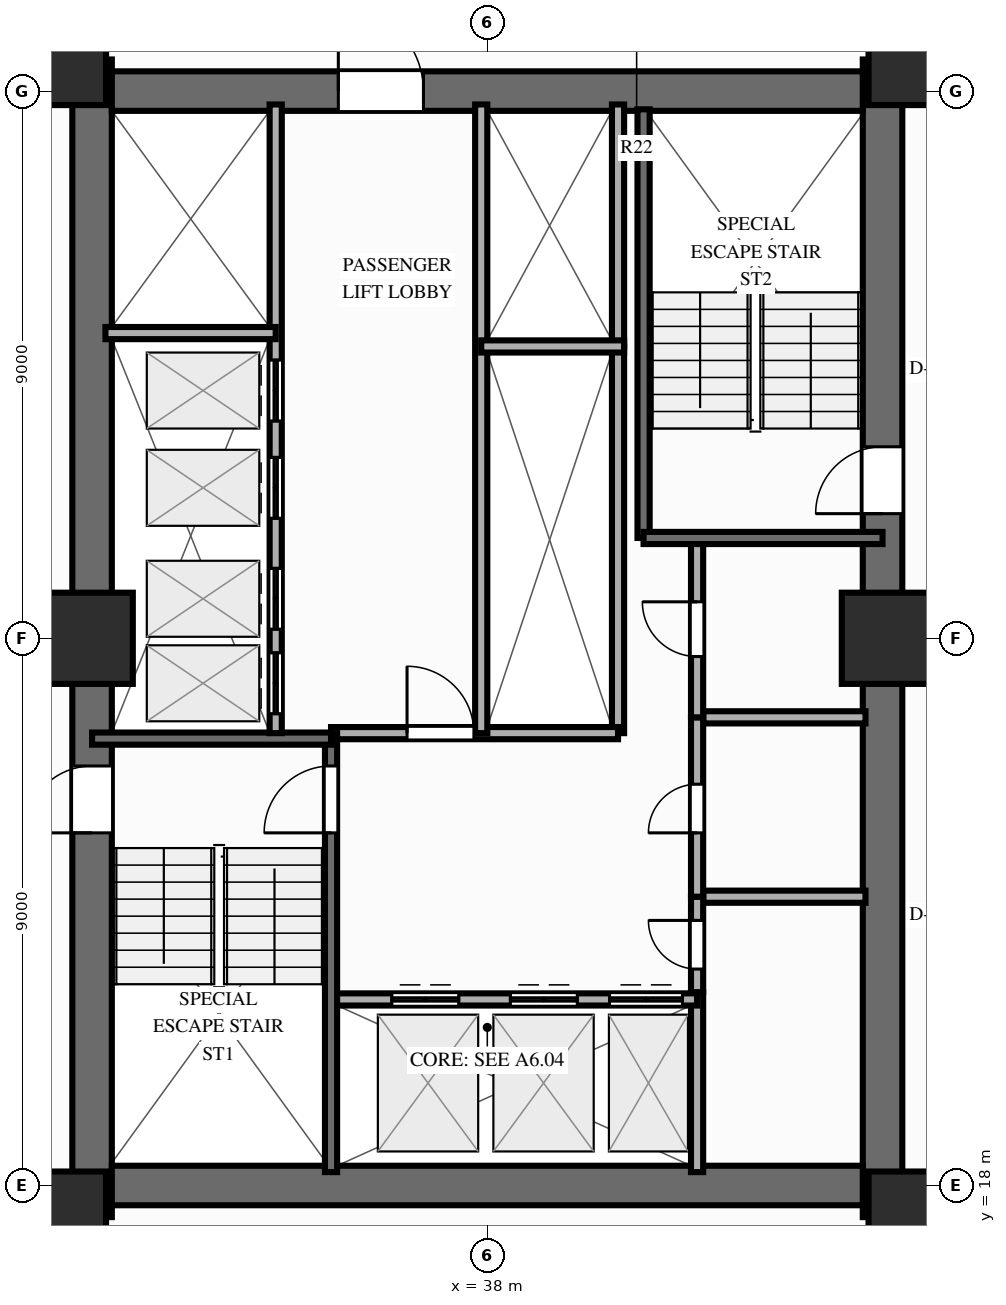
"""IFC4 building model, lengths in metres.
Left out: names, types, materials, properties, quantities, classifications, styles, units other than length and angle.
Written with IfcOpenShell. Run it as: python <this file> out.ifc"""

import sys

from ifc_helpers import new_model, si_unit, direction, frame, frame_2d, origin, origin_2d, place, context, subcontext, project, spatial, rectangle, extrude, source, transform, mapped, element, fill, save


model = new_model("IFC4")
c1 = context("Model", 3, precision=1e-05, world=origin(), true_north=direction((0.0, 1.0)))
c2 = subcontext(c1, "Body", "Model", "MODEL_VIEW")
j1 = project(units=[si_unit("LENGTHUNIT", "METRE"), si_unit("PLANEANGLEUNIT", "RADIAN")], contexts=[c1])
p1 = place(None, origin())
s1 = spatial("IfcSite", under=j1, at=p1, CompositionType="ELEMENT")
p2 = place(p1, origin())
s2 = spatial("IfcBuilding", under=s1, at=p2, CompositionType="ELEMENT")
p3 = place(p2, frame((0.0, 0.0, 34.4)))
s3 = spatial("IfcBuildingStorey", under=s2, at=p3, CompositionType="ELEMENT", Elevation=34.4)
p4 = place(p3, frame((31.5, 17.48, 0.0), z_axis=(0.0, 0.0, 1.0), x_axis=(0.0, 1.0, 0.0)))
e1 = element("IfcWall", 1, at=p4, inside=s3, PredefinedType="SHEAR", context=c2, shape_type="SweptSolid", body=[
    extrude(rectangle(XDim=19.04, YDim=0.65, at=frame_2d((9.52, 0.0))), origin(), (0.0, 0.0, 1.0), 3.0),
])
p5 = place(p4, frame((6.32, 0.0, 0.0)))
e2 = element("IfcOpeningElement", 2, at=p5, cuts=e1, PredefinedType="OPENING", context=c2, shape_type="SweptSolid", body=[
    extrude(rectangle(XDim=1.1, YDim=2.15, at=frame_2d((0.55, 1.075))), frame((0.0, 0.337, 0.0), z_axis=(0.0, -1.0, 0.0), x_axis=(1.0, 0.0, 0.0)), (0.0, 0.0, 1.0), 0.674),
])
p6 = place(p3, frame((44.5, 17.48, 0.0), z_axis=(0.0, 0.0, 1.0), x_axis=(0.0, 1.0, 0.0)))
e3 = element("IfcWall", 3, at=p6, inside=s3, PredefinedType="SHEAR", context=c2, shape_type="SweptSolid", body=[
    extrude(rectangle(XDim=19.04, YDim=0.65, at=frame_2d((9.52, 0.0))), origin(), (0.0, 0.0, 1.0), 3.0),
])
p7 = place(p6, frame((12.67, 0.0, 0.0), z_axis=(0.0, 0.0, 1.0), x_axis=(-1.0, 0.0, 0.0)))
e4 = element("IfcOpeningElement", 4, at=p7, cuts=e3, PredefinedType="OPENING", context=c2, shape_type="SweptSolid", body=[
    extrude(rectangle(XDim=1.1, YDim=2.15, at=frame_2d((0.55, 1.075))), frame((0.0, 0.337, 0.0), z_axis=(0.0, -1.0, 0.0), x_axis=(1.0, 0.0, 0.0)), (0.0, 0.0, 1.0), 0.674),
])
p8 = place(p3, frame((31.825, 18.0, 0.0), z_axis=(0.0, 0.0, 1.0), x_axis=(1.0, 0.0, 0.0)))
e5 = element("IfcWall", 5, at=p8, inside=s3, PredefinedType="SHEAR", context=c2, shape_type="SweptSolid", body=[
    extrude(rectangle(XDim=12.35, YDim=0.65, at=frame_2d((6.175, 0.0))), origin(), (0.0, 0.0, 1.0), 3.0),
])
p9 = place(p3, frame((31.825, 36.0, 0.0), z_axis=(0.0, 0.0, 1.0), x_axis=(1.0, 0.0, 0.0)))
e6 = element("IfcWall", 6, at=p9, inside=s3, PredefinedType="SHEAR", context=c2, shape_type="SweptSolid", body=[
    extrude(rectangle(XDim=12.35, YDim=0.65, at=frame_2d((6.175, 0.0))), origin(), (0.0, 0.0, 1.0), 3.0),
])
p10 = place(p9, frame((5.125, 0.0, 0.0), z_axis=(0.0, 0.0, 1.0), x_axis=(-1.0, 0.0, 0.0)))
e7 = element("IfcOpeningElement", 7, at=p10, cuts=e6, PredefinedType="OPENING", context=c2, shape_type="SweptSolid", body=[
    extrude(rectangle(XDim=1.4, YDim=2.15, at=frame_2d((0.7, 1.075))), frame((0.0, 0.337, 0.0), z_axis=(0.0, -1.0, 0.0), x_axis=(1.0, 0.0, 0.0)), (0.0, 0.0, 1.0), 0.674),
])
m1 = source(origin(), c2, "Body", "SweptSolid", [
    extrude(rectangle(XDim=1.5, YDim=1.5, at=origin_2d()), origin(), (0.0, 0.0, 1.0), 3.0),
])
for number, where, z_axis, x_axis in (
    (8, (30.98, 17.48, 0.0), (0.0, 0.0, 1.0), (1.0, 0.0, 0.0)),
    (9, (45.02, 17.48, 0.0), (0.0, 0.0, 1.0), (1.0, 0.0, 0.0)),
    (10, (30.98, 36.52, 0.0), (0.0, 0.0, 1.0), (1.0, 0.0, 0.0)),
    (11, (45.02, 36.52, 0.0), (0.0, 0.0, 1.0), (1.0, 0.0, 0.0)),
    (12, (31.42, 27.0, 0.0), (0.0, 0.0, 1.0), (1.0, 0.0, 0.0)),
    (13, (44.58, 27.0, 0.0), (0.0, 0.0, 1.0), (1.0, 0.0, 0.0)),
):
    element("IfcColumn", number, at=place(p3, frame(where, z_axis=z_axis, x_axis=x_axis)), inside=s3, PredefinedType="COLUMN", context=c2, shape_type="MappedRepresentation", body=[
        mapped(m1, transform((0.0, 0.0, 0.0), scale=1.0)),
    ])
p11 = place(p3, frame((41.55, 22.75, 0.0), z_axis=(0.0, 0.0, 1.0), x_axis=(1.0, 0.0, 0.0)))
e14 = element("IfcWall", 14, at=p11, inside=s3, PredefinedType="PARTITIONING", context=c2, shape_type="SweptSolid", body=[
    extrude(rectangle(XDim=2.67, YDim=0.2, at=frame_2d((1.335, 0.0))), origin(), (0.0, 0.0, 1.0), 2.79),
])
p12 = place(p3, frame((41.55, 25.7, 0.0), z_axis=(0.0, 0.0, 1.0), x_axis=(1.0, 0.0, 0.0)))
e15 = element("IfcWall", 15, at=p12, inside=s3, PredefinedType="PARTITIONING", context=c2, shape_type="SweptSolid", body=[
    extrude(rectangle(XDim=2.67, YDim=0.2, at=frame_2d((1.335, 0.0))), origin(), (0.0, 0.0, 1.0), 2.14),
])
p13 = place(p3, frame((41.45, 18.22, 0.0), z_axis=(0.0, 0.0, 1.0), x_axis=(0.0, 1.0, 0.0)))
e16 = element("IfcWall", 16, at=p13, inside=s3, PredefinedType="PARTITIONING", context=c2, shape_type="SweptSolid", body=[
    extrude(rectangle(XDim=2.96, YDim=0.2, at=frame_2d((1.48, 0.0))), origin(), (0.0, 0.0, 1.0), 2.79),
])
p14 = place(p3, frame((41.45, 21.18, 0.0), z_axis=(0.0, 0.0, 1.0), x_axis=(0.0, 1.0, 0.0)))
e17 = element("IfcWall", 17, at=p14, inside=s3, PredefinedType="PARTITIONING", context=c2, shape_type="SweptSolid", body=[
    extrude(rectangle(XDim=1.57, YDim=0.2, at=frame_2d((0.785, 0.0))), origin(), (0.0, 0.0, 1.0), 2.79),
])
p15 = place(p14, frame((0.38, 0.0, 0.0)))
e18 = element("IfcOpeningElement", 18, at=p15, cuts=e17, PredefinedType="OPENING", context=c2, shape_type="SweptSolid", body=[
    extrude(rectangle(XDim=0.8, YDim=2.05, at=frame_2d((0.4, 1.025))), frame((0.0, 0.112, 0.0), z_axis=(0.0, -1.0, 0.0), x_axis=(1.0, 0.0, 0.0)), (0.0, 0.0, 1.0), 0.224),
])
p16 = place(p3, frame((41.45, 22.75, 0.0), z_axis=(0.0, 0.0, 1.0), x_axis=(0.0, 1.0, 0.0)))
e19 = element("IfcWall", 19, at=p16, inside=s3, PredefinedType="PARTITIONING", context=c2, shape_type="SweptSolid", body=[
    extrude(rectangle(XDim=2.95, YDim=0.2, at=frame_2d((1.475, 0.0))), origin(), (0.0, 0.0, 1.0), 2.79),
])
p17 = place(p16, frame((1.05, 0.0, 0.0)))
e20 = element("IfcOpeningElement", 20, at=p17, cuts=e19, PredefinedType="OPENING", context=c2, shape_type="SweptSolid", body=[
    extrude(rectangle(XDim=0.8, YDim=2.05, at=frame_2d((0.4, 1.025))), frame((0.0, 0.112, 0.0), z_axis=(0.0, -1.0, 0.0), x_axis=(1.0, 0.0, 0.0)), (0.0, 0.0, 1.0), 0.224),
])
p18 = place(p3, frame((41.45, 25.7, 0.0), z_axis=(0.0, 0.0, 1.0), x_axis=(0.0, 1.0, 0.0)))
e21 = element("IfcWall", 21, at=p18, inside=s3, PredefinedType="PARTITIONING", context=c2, shape_type="SweptSolid", body=[
    extrude(rectangle(XDim=2.9, YDim=0.2, at=frame_2d((1.45, 0.0))), origin(), (0.0, 0.0, 1.0), 2.79),
])
p19 = place(p18, frame((1.0, 0.0, 0.0)))
e22 = element("IfcOpeningElement", 22, at=p19, cuts=e21, PredefinedType="OPENING", context=c2, shape_type="SweptSolid", body=[
    extrude(rectangle(XDim=0.9, YDim=2.1, at=frame_2d((0.45, 1.05))), frame((0.0, 0.112, 0.0), z_axis=(0.0, -1.0, 0.0), x_axis=(1.0, 0.0, 0.0)), (0.0, 0.0, 1.0), 0.224),
])
p20 = place(p3, frame((40.15, 25.44, 0.0), z_axis=(0.0, 0.0, 1.0), x_axis=(0.0, 1.0, 0.0)))
e23 = element("IfcWall", 23, at=p20, inside=s3, PredefinedType="PARTITIONING", context=c2, shape_type="SweptSolid", body=[
    extrude(rectangle(XDim=6.36, YDim=0.2, at=frame_2d((3.18, 0.0))), origin(), (0.0, 0.0, 1.0), 2.79),
])
p21 = place(p3, frame((40.15, 31.8, 0.0), z_axis=(0.0, 0.0, 1.0), x_axis=(0.0, 1.0, 0.0)))
e24 = element("IfcWall", 24, at=p21, inside=s3, PredefinedType="PARTITIONING", context=c2, shape_type="SweptSolid", body=[
    extrude(rectangle(XDim=3.98, YDim=0.2, at=frame_2d((1.99, 0.0))), origin(), (0.0, 0.0, 1.0), 2.79),
])
p22 = place(p3, frame((35.43, 21.06, 0.0), z_axis=(0.0, 0.0, 1.0), x_axis=(1.0, 0.0, 0.0)))
e25 = element("IfcWall", 25, at=p22, inside=s3, PredefinedType="PARTITIONING", context=c2, shape_type="SweptSolid", body=[
    extrude(rectangle(XDim=6.02, YDim=0.2, at=frame_2d((3.01, 0.0))), origin(), (0.0, 0.0, 1.0), 2.79),
])
p23 = place(p22, frame((1.0, 0.0, 0.0)))
e26 = element("IfcOpeningElement", 26, at=p23, cuts=e25, PredefinedType="OPENING", context=c2, shape_type="SweptSolid", body=[
    extrude(rectangle(XDim=1.1, YDim=2.15, at=frame_2d((0.55, 1.075))), frame((0.0, 0.112, 0.0), z_axis=(0.0, -1.0, 0.0), x_axis=(1.0, 0.0, 0.0)), (0.0, 0.0, 1.0), 0.224),
])
p24 = place(p22, frame((2.95, 0.0, 0.0)))
e27 = element("IfcOpeningElement", 27, at=p24, cuts=e25, PredefinedType="OPENING", context=c2, shape_type="SweptSolid", body=[
    extrude(rectangle(XDim=1.1, YDim=2.15, at=frame_2d((0.55, 1.075))), frame((0.0, 0.112, 0.0), z_axis=(0.0, -1.0, 0.0), x_axis=(1.0, 0.0, 0.0)), (0.0, 0.0, 1.0), 0.224),
])
p25 = place(p22, frame((4.58, 0.0, 0.0)))
e28 = element("IfcOpeningElement", 28, at=p25, cuts=e25, PredefinedType="OPENING", context=c2, shape_type="SweptSolid", body=[
    extrude(rectangle(XDim=1.2, YDim=2.15, at=frame_2d((0.6, 1.075))), frame((0.0, 0.112, 0.0), z_axis=(0.0, -1.0, 0.0), x_axis=(1.0, 0.0, 0.0)), (0.0, 0.0, 1.0), 0.224),
])
p26 = place(p3, frame((35.43, 25.44, 0.0), z_axis=(0.0, 0.0, 1.0), x_axis=(1.0, 0.0, 0.0)))
e29 = element("IfcWall", 29, at=p26, inside=s3, PredefinedType="PARTITIONING", context=c2, shape_type="SweptSolid", body=[
    extrude(rectangle(XDim=4.72, YDim=0.2, at=frame_2d((2.36, 0.0))), origin(), (0.0, 0.0, 1.0), 2.79),
])
p27 = place(p26, frame((1.25, 0.0, 0.0)))
e30 = element("IfcOpeningElement", 30, at=p27, cuts=e29, PredefinedType="OPENING", context=c2, shape_type="SweptSolid", body=[
    extrude(rectangle(XDim=1.1, YDim=2.15, at=frame_2d((0.55, 1.075))), frame((0.0, 0.112, 0.0), z_axis=(0.0, -1.0, 0.0), x_axis=(1.0, 0.0, 0.0)), (0.0, 0.0, 1.0), 0.224),
])
p28 = place(p3, frame((35.43, 18.22, 0.0), z_axis=(0.0, 0.0, 1.0), x_axis=(0.0, 1.0, 0.0)))
e31 = element("IfcWall", 31, at=p28, inside=s3, PredefinedType="SOLIDWALL", context=c2, shape_type="SweptSolid", body=[
    extrude(rectangle(XDim=7.22, YDim=0.2, at=frame_2d((3.61, 0.0))), origin(), (0.0, 0.0, 1.0), 2.79),
])
p29 = place(p28, frame((6.68, 0.0, 0.0), z_axis=(0.0, 0.0, 1.0), x_axis=(-1.0, 0.0, 0.0)))
e32 = element("IfcOpeningElement", 32, at=p29, cuts=e31, PredefinedType="OPENING", context=c2, shape_type="SweptSolid", body=[
    extrude(rectangle(XDim=1.1, YDim=2.15, at=frame_2d((0.55, 1.075))), frame((0.0, 0.112, 0.0), z_axis=(0.0, -1.0, 0.0), x_axis=(1.0, 0.0, 0.0)), (0.0, 0.0, 1.0), 0.224),
])
p30 = place(p3, frame((31.5, 25.35, 0.0), z_axis=(0.0, 0.0, 1.0), x_axis=(1.0, 0.0, 0.0)))
e33 = element("IfcWall", 33, at=p30, inside=s3, PredefinedType="SOLIDWALL", context=c2, shape_type="SweptSolid", body=[
    extrude(rectangle(XDim=3.93, YDim=0.2, at=frame_2d((1.965, 0.0))), origin(), (0.0, 0.0, 1.0), 2.79),
])
p31 = place(p3, frame((40.57, 28.65, 0.0), z_axis=(0.0, 0.0, 1.0), x_axis=(0.0, 1.0, 0.0)))
e34 = element("IfcWall", 34, at=p31, inside=s3, PredefinedType="SOLIDWALL", context=c2, shape_type="SweptSolid", body=[
    extrude(rectangle(XDim=7.05, YDim=0.2, at=frame_2d((3.525, 0.0))), origin(), (0.0, 0.0, 1.0), 2.79),
])
p32 = place(p3, frame((40.57, 28.65, 0.0), z_axis=(0.0, 0.0, 1.0), x_axis=(1.0, 0.0, 0.0)))
e35 = element("IfcWall", 35, at=p32, inside=s3, PredefinedType="SOLIDWALL", context=c2, shape_type="SweptSolid", body=[
    extrude(rectangle(XDim=3.93, YDim=0.2, at=frame_2d((1.965, 0.0))), origin(), (0.0, 0.0, 1.0), 2.79),
])
p33 = place(p3, frame((34.52, 25.44, 0.0), z_axis=(0.0, 0.0, 1.0), x_axis=(0.0, 1.0, 0.0)))
e36 = element("IfcWall", 36, at=p33, inside=s3, PredefinedType="PARTITIONING", context=c2, shape_type="SweptSolid", body=[
    extrude(rectangle(XDim=10.34, YDim=0.2, at=frame_2d((5.17, 0.0))), origin(), (0.0, 0.0, 1.0), 2.79),
])
p34 = place(p33, frame((0.32, 0.0, 0.0)))
e37 = element("IfcOpeningElement", 37, at=p34, cuts=e36, PredefinedType="OPENING", context=c2, shape_type="SweptSolid", body=[
    extrude(rectangle(XDim=1.0, YDim=2.15, at=frame_2d((0.5, 1.075))), frame((0.0, 0.112, 0.0), z_axis=(0.0, -1.0, 0.0), x_axis=(1.0, 0.0, 0.0)), (0.0, 0.0, 1.0), 0.224),
])
p35 = place(p33, frame((1.71, 0.0, 0.0)))
e38 = element("IfcOpeningElement", 38, at=p35, cuts=e36, PredefinedType="OPENING", context=c2, shape_type="SweptSolid", body=[
    extrude(rectangle(XDim=1.0, YDim=2.15, at=frame_2d((0.5, 1.075))), frame((0.0, 0.112, 0.0), z_axis=(0.0, -1.0, 0.0), x_axis=(1.0, 0.0, 0.0)), (0.0, 0.0, 1.0), 0.224),
])
p36 = place(p33, frame((3.535, 0.0, 0.0)))
e39 = element("IfcOpeningElement", 39, at=p36, cuts=e36, PredefinedType="OPENING", context=c2, shape_type="SweptSolid", body=[
    extrude(rectangle(XDim=1.0, YDim=2.15, at=frame_2d((0.5, 1.075))), frame((0.0, 0.112, 0.0), z_axis=(0.0, -1.0, 0.0), x_axis=(1.0, 0.0, 0.0)), (0.0, 0.0, 1.0), 0.224),
])
p37 = place(p33, frame((5.135, 0.0, 0.0)))
e40 = element("IfcOpeningElement", 40, at=p37, cuts=e36, PredefinedType="OPENING", context=c2, shape_type="SweptSolid", body=[
    extrude(rectangle(XDim=1.0, YDim=2.15, at=frame_2d((0.5, 1.075))), frame((0.0, 0.112, 0.0), z_axis=(0.0, -1.0, 0.0), x_axis=(1.0, 0.0, 0.0)), (0.0, 0.0, 1.0), 0.224),
])
p38 = place(p3, frame((31.72, 32.02, 0.0), z_axis=(0.0, 0.0, 1.0), x_axis=(1.0, 0.0, 0.0)))
e41 = element("IfcWall", 41, at=p38, inside=s3, PredefinedType="PARTITIONING", context=c2, shape_type="SweptSolid", body=[
    extrude(rectangle(XDim=2.8, YDim=0.2, at=frame_2d((1.4, 0.0))), origin(), (0.0, 0.0, 1.0), 2.79),
])
p39 = place(p3, frame((37.9, 25.44, 0.0), z_axis=(0.0, 0.0, 1.0), x_axis=(0.0, 1.0, 0.0)))
e42 = element("IfcWall", 42, at=p39, inside=s3, PredefinedType="PARTITIONING", context=c2, shape_type="SweptSolid", body=[
    extrude(rectangle(XDim=10.34, YDim=0.2, at=frame_2d((5.17, 0.0))), origin(), (0.0, 0.0, 1.0), 2.79),
])
p40 = place(p3, frame((37.9, 31.8, 0.0), z_axis=(0.0, 0.0, 1.0), x_axis=(1.0, 0.0, 0.0)))
e43 = element("IfcWall", 43, at=p40, inside=s3, PredefinedType="PARTITIONING", context=c2, shape_type="SweptSolid", body=[
    extrude(rectangle(XDim=2.35, YDim=0.2, at=frame_2d((1.175, 0.0))), origin(), (0.0, 0.0, 1.0), 2.79),
])
m2 = source(origin(), c2, "Body", "SweptSolid", [
    extrude(rectangle(XDim=1.1, YDim=2.15, at=frame_2d((0.55, 1.075))), frame((0.0, 0.025, 0.0), z_axis=(0.0, -1.0, 0.0), x_axis=(1.0, 0.0, 0.0)), (0.0, 0.0, 1.0), 0.05),
])
p41 = place(p5, origin())
e44 = element("IfcDoor", 44, at=p41, inside=s3, OperationType="SINGLE_SWING_LEFT", PredefinedType="DOOR", context=c2, shape_type="MappedRepresentation", body=[
    mapped(m2, transform((0.0, 0.0, 0.0), scale=1.0)),
])
fill(e2, e44)
p42 = place(p7, origin())
e45 = element("IfcDoor", 45, at=p42, inside=s3, OperationType="SINGLE_SWING_RIGHT", PredefinedType="DOOR", context=c2, shape_type="MappedRepresentation", body=[
    mapped(m2, transform((0.0, 0.0, 0.0), scale=1.0)),
])
fill(e4, e45)
m3 = source(origin(), c2, "Body", "SweptSolid", [
    extrude(rectangle(XDim=1.4, YDim=2.15, at=frame_2d((0.7, 1.075))), frame((0.0, 0.025, 0.0), z_axis=(0.0, -1.0, 0.0), x_axis=(1.0, 0.0, 0.0)), (0.0, 0.0, 1.0), 0.05),
])
p43 = place(p10, origin())
e46 = element("IfcDoor", 46, at=p43, inside=s3, OperationType="SINGLE_SWING_RIGHT", PredefinedType="DOOR", context=c2, shape_type="MappedRepresentation", body=[
    mapped(m3, transform((0.0, 0.0, 0.0), scale=1.0)),
])
fill(e7, e46)
m4 = source(origin(), c2, "Body", "SweptSolid", [
    extrude(rectangle(XDim=0.8, YDim=2.05, at=frame_2d((0.4, 1.025))), frame((0.0, 0.025, 0.0), z_axis=(0.0, -1.0, 0.0), x_axis=(1.0, 0.0, 0.0)), (0.0, 0.0, 1.0), 0.05),
])
p44 = place(p15, origin())
e47 = element("IfcDoor", 47, at=p44, inside=s3, OperationType="SINGLE_SWING_RIGHT", PredefinedType="DOOR", context=c2, shape_type="MappedRepresentation", body=[
    mapped(m4, transform((0.0, 0.0, 0.0), scale=1.0)),
])
fill(e18, e47)
p45 = place(p17, origin())
e48 = element("IfcDoor", 48, at=p45, inside=s3, OperationType="SINGLE_SWING_LEFT", PredefinedType="DOOR", context=c2, shape_type="MappedRepresentation", body=[
    mapped(m4, transform((0.0, 0.0, 0.0), scale=1.0)),
])
fill(e20, e48)
m5 = source(origin(), c2, "Body", "SweptSolid", [
    extrude(rectangle(XDim=0.9, YDim=2.1, at=frame_2d((0.45, 1.05))), frame((0.0, 0.025, 0.0), z_axis=(0.0, -1.0, 0.0), x_axis=(1.0, 0.0, 0.0)), (0.0, 0.0, 1.0), 0.05),
])
p46 = place(p19, origin())
e49 = element("IfcDoor", 49, at=p46, inside=s3, OperationType="SINGLE_SWING_RIGHT", PredefinedType="DOOR", context=c2, shape_type="MappedRepresentation", body=[
    mapped(m5, transform((0.0, 0.0, 0.0), scale=1.0)),
])
fill(e22, e49)
p47 = place(p23, origin())
e50 = element("IfcDoor", 50, at=p47, inside=s3, OperationType="DOUBLE_DOOR_SLIDING", PredefinedType="DOOR", context=c2, shape_type="MappedRepresentation", body=[
    mapped(m2, transform((0.0, 0.0, 0.0), scale=1.0)),
])
fill(e26, e50)
p48 = place(p24, origin())
e51 = element("IfcDoor", 51, at=p48, inside=s3, OperationType="DOUBLE_DOOR_SLIDING", PredefinedType="DOOR", context=c2, shape_type="MappedRepresentation", body=[
    mapped(m2, transform((0.0, 0.0, 0.0), scale=1.0)),
])
fill(e27, e51)
m6 = source(origin(), c2, "Body", "SweptSolid", [
    extrude(rectangle(XDim=1.2, YDim=2.15, at=frame_2d((0.6, 1.075))), frame((0.0, 0.025, 0.0), z_axis=(0.0, -1.0, 0.0), x_axis=(1.0, 0.0, 0.0)), (0.0, 0.0, 1.0), 0.05),
])
p49 = place(p25, origin())
e52 = element("IfcDoor", 52, at=p49, inside=s3, OperationType="DOUBLE_DOOR_SLIDING", PredefinedType="DOOR", context=c2, shape_type="MappedRepresentation", body=[
    mapped(m6, transform((0.0, 0.0, 0.0), scale=1.0)),
])
fill(e28, e52)
p50 = place(p27, origin())
e53 = element("IfcDoor", 53, at=p50, inside=s3, OperationType="SINGLE_SWING_LEFT", PredefinedType="DOOR", context=c2, shape_type="MappedRepresentation", body=[
    mapped(m2, transform((0.0, 0.0, 0.0), scale=1.0)),
])
fill(e30, e53)
p51 = place(p29, origin())
e54 = element("IfcDoor", 54, at=p51, inside=s3, OperationType="SINGLE_SWING_RIGHT", PredefinedType="DOOR", context=c2, shape_type="MappedRepresentation", body=[
    mapped(m2, transform((0.0, 0.0, 0.0), scale=1.0)),
])
fill(e32, e54)
m7 = source(origin(), c2, "Body", "SweptSolid", [
    extrude(rectangle(XDim=1.0, YDim=2.15, at=frame_2d((0.5, 1.075))), frame((0.0, 0.025, 0.0), z_axis=(0.0, -1.0, 0.0), x_axis=(1.0, 0.0, 0.0)), (0.0, 0.0, 1.0), 0.05),
])
p52 = place(p34, origin())
e55 = element("IfcDoor", 55, at=p52, inside=s3, OperationType="DOUBLE_DOOR_SLIDING", PredefinedType="DOOR", context=c2, shape_type="MappedRepresentation", body=[
    mapped(m7, transform((0.0, 0.0, 0.0), scale=1.0)),
])
fill(e37, e55)
p53 = place(p35, origin())
e56 = element("IfcDoor", 56, at=p53, inside=s3, OperationType="DOUBLE_DOOR_SLIDING", PredefinedType="DOOR", context=c2, shape_type="MappedRepresentation", body=[
    mapped(m7, transform((0.0, 0.0, 0.0), scale=1.0)),
])
fill(e38, e56)
p54 = place(p36, origin())
e57 = element("IfcDoor", 57, at=p54, inside=s3, OperationType="DOUBLE_DOOR_SLIDING", PredefinedType="DOOR", context=c2, shape_type="MappedRepresentation", body=[
    mapped(m7, transform((0.0, 0.0, 0.0), scale=1.0)),
])
fill(e39, e57)
p55 = place(p37, origin())
e58 = element("IfcDoor", 58, at=p55, inside=s3, OperationType="DOUBLE_DOOR_SLIDING", PredefinedType="DOOR", context=c2, shape_type="MappedRepresentation", body=[
    mapped(m7, transform((0.0, 0.0, 0.0), scale=1.0)),
])
fill(e40, e58)
save(model, sys.argv[1])
